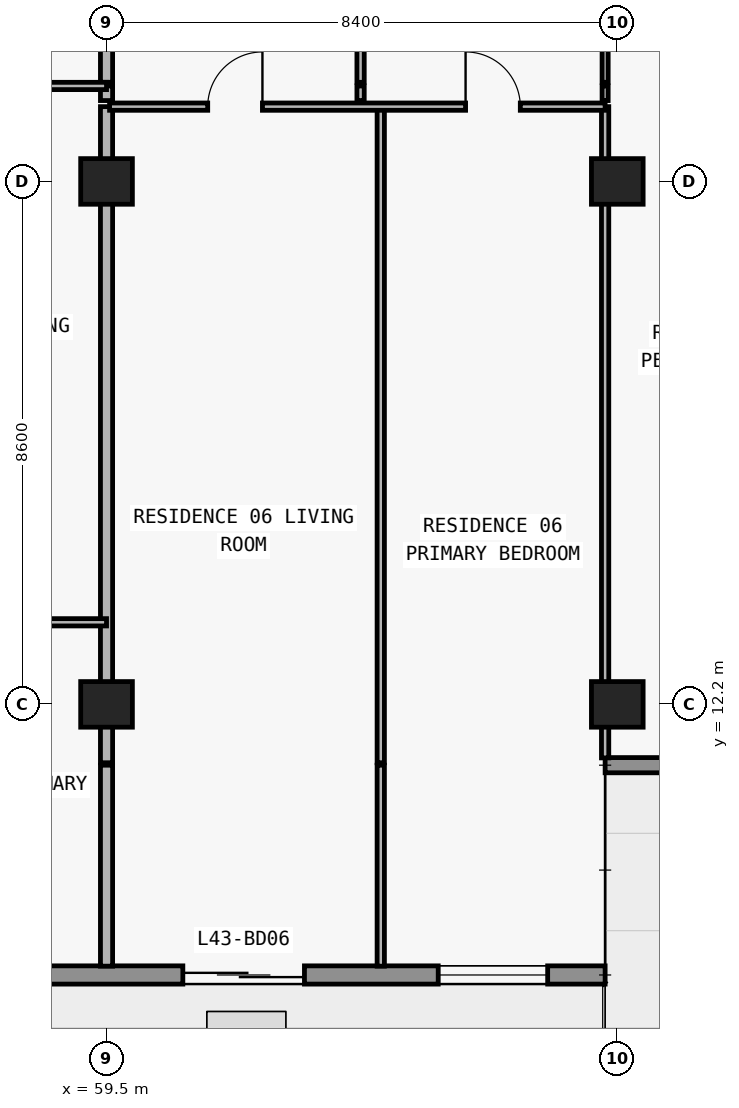
"""IFC4 building model, lengths in metres.
Left out: names, types, materials, properties, quantities, classifications, styles, units other than length and angle.
Written with IfcOpenShell. Run it as: python <this file> out.ifc"""

import sys

from ifc_helpers import new_model, si_unit, direction, frame, frame_2d, origin, origin_2d, place, context, subcontext, project, spatial, rectangle, extrude, element, fill, save


model = new_model("IFC4")
c1 = context("Model", 3, precision=1e-05, world=origin(), true_north=direction((0.0, 1.0)))
c2 = subcontext(c1, "Body", "Model", "MODEL_VIEW")
j1 = project(units=[si_unit("LENGTHUNIT", "METRE"), si_unit("PLANEANGLEUNIT", "RADIAN")], contexts=[c1])
p1 = place(None, origin())
s1 = spatial("IfcSite", under=j1, at=p1, CompositionType="ELEMENT")
p2 = place(p1, origin())
s2 = spatial("IfcBuilding", under=s1, at=p2, CompositionType="ELEMENT")
p3 = place(p2, frame((0.0, 0.0, 157.2)))
s3 = spatial("IfcBuildingStorey", under=s2, at=p3, CompositionType="ELEMENT", Elevation=157.2)
for number, where, z_axis, x_axis in (
    (1, (59.5, 12.2, 0.0), (0.0, 0.0, 1.0), (1.0, 0.0, 0.0)),
    (2, (67.9, 12.2, 0.0), (0.0, 0.0, 1.0), (1.0, 0.0, 0.0)),
    (3, (59.5, 20.8, 0.0), (0.0, 0.0, 1.0), (1.0, 0.0, 0.0)),
    (4, (67.9, 20.8, 0.0), (0.0, 0.0, 1.0), (1.0, 0.0, 0.0)),
):
    element("IfcColumn", number, at=place(p3, frame(where, z_axis=z_axis, x_axis=x_axis)), inside=s3, PredefinedType="COLUMN", context=c2, shape_type="SweptSolid", body=[
        extrude(rectangle(XDim=0.85, YDim=0.75, at=origin_2d()), origin(), (0.0, 0.0, 1.0), 3.05),
    ])
p4 = place(p3, frame((67.7, 7.75, 0.0), z_axis=(0.0, 0.0, 1.0), x_axis=(-1.0, 0.0, 0.0)))
e5 = element("IfcWall", 5, at=p4, inside=s3, PredefinedType="STANDARD", context=c2, shape_type="SweptSolid", body=[
    extrude(rectangle(XDim=57.6, YDim=0.3, at=frame_2d((28.8, 0.0))), origin(), (0.0, 0.0, 1.0), 3.05),
])
p5 = place(p4, frame((54.673, 0.0, 0.0)))
e6 = element("IfcOpeningElement", 6, at=p5, cuts=e5, PredefinedType="OPENING", context=c2, shape_type="SweptSolid", body=[
    extrude(rectangle(XDim=2.0, YDim=2.3, at=frame_2d((1.0, 1.15))), frame((0.0, 0.16, 0.0), z_axis=(0.0, -1.0, 0.0), x_axis=(1.0, 0.0, 0.0)), (0.0, 0.0, 1.0), 0.32),
])
p6 = place(p4, frame((50.473, 0.0, 0.85)))
e7 = element("IfcOpeningElement", 7, at=p6, cuts=e5, PredefinedType="OPENING", context=c2, shape_type="SweptSolid", body=[
    extrude(rectangle(XDim=2.2, YDim=1.55, at=frame_2d((1.1, 0.775))), frame((0.0, 0.16, 0.0), z_axis=(0.0, -1.0, 0.0), x_axis=(1.0, 0.0, 0.0)), (0.0, 0.0, 1.0), 0.32),
])
p7 = place(p4, frame((46.09, 0.0, 0.0)))
e8 = element("IfcOpeningElement", 8, at=p7, cuts=e5, PredefinedType="OPENING", context=c2, shape_type="SweptSolid", body=[
    extrude(rectangle(XDim=2.0, YDim=2.3, at=frame_2d((1.0, 1.15))), frame((0.0, 0.16, 0.0), z_axis=(0.0, -1.0, 0.0), x_axis=(1.0, 0.0, 0.0)), (0.0, 0.0, 1.0), 0.32),
])
p8 = place(p4, frame((41.99, 0.0, 0.85)))
e9 = element("IfcOpeningElement", 9, at=p8, cuts=e5, PredefinedType="OPENING", context=c2, shape_type="SweptSolid", body=[
    extrude(rectangle(XDim=1.8, YDim=1.55, at=frame_2d((0.9, 0.775))), frame((0.0, 0.16, 0.0), z_axis=(0.0, -1.0, 0.0), x_axis=(1.0, 0.0, 0.0)), (0.0, 0.0, 1.0), 0.32),
])
p9 = place(p4, frame((38.09, 0.0, 0.0)))
e10 = element("IfcOpeningElement", 10, at=p9, cuts=e5, PredefinedType="OPENING", context=c2, shape_type="SweptSolid", body=[
    extrude(rectangle(XDim=2.0, YDim=2.3, at=frame_2d((1.0, 1.15))), frame((0.0, 0.16, 0.0), z_axis=(0.0, -1.0, 0.0), x_axis=(1.0, 0.0, 0.0)), (0.0, 0.0, 1.0), 0.32),
])
p10 = place(p4, frame((33.41, 0.0, 0.65)))
e11 = element("IfcOpeningElement", 11, at=p10, cuts=e5, PredefinedType="OPENING", context=c2, shape_type="SweptSolid", body=[
    extrude(rectangle(XDim=2.6, YDim=1.85, at=frame_2d((1.3, 0.925))), frame((0.0, 0.16, 0.0), z_axis=(0.0, -1.0, 0.0), x_axis=(1.0, 0.0, 0.0)), (0.0, 0.0, 1.0), 0.32),
])
p11 = place(p4, frame((27.7, 0.0, 0.85)))
e12 = element("IfcOpeningElement", 12, at=p11, cuts=e5, PredefinedType="OPENING", context=c2, shape_type="SweptSolid", body=[
    extrude(rectangle(XDim=2.2, YDim=1.55, at=frame_2d((1.1, 0.775))), frame((0.0, 0.16, 0.0), z_axis=(0.0, -1.0, 0.0), x_axis=(1.0, 0.0, 0.0)), (0.0, 0.0, 1.0), 0.32),
])
p12 = place(p4, frame((21.69, 0.0, 0.0)))
e13 = element("IfcOpeningElement", 13, at=p12, cuts=e5, PredefinedType="OPENING", context=c2, shape_type="SweptSolid", body=[
    extrude(rectangle(XDim=2.0, YDim=2.3, at=frame_2d((1.0, 1.15))), frame((0.0, 0.16, 0.0), z_axis=(0.0, -1.0, 0.0), x_axis=(1.0, 0.0, 0.0)), (0.0, 0.0, 1.0), 0.32),
])
p13 = place(p4, frame((17.59, 0.0, 0.85)))
e14 = element("IfcOpeningElement", 14, at=p13, cuts=e5, PredefinedType="OPENING", context=c2, shape_type="SweptSolid", body=[
    extrude(rectangle(XDim=1.8, YDim=1.55, at=frame_2d((0.9, 0.775))), frame((0.0, 0.16, 0.0), z_axis=(0.0, -1.0, 0.0), x_axis=(1.0, 0.0, 0.0)), (0.0, 0.0, 1.0), 0.32),
])
p14 = place(p4, frame((13.626, 0.0, 0.0)))
e15 = element("IfcOpeningElement", 15, at=p14, cuts=e5, PredefinedType="OPENING", context=c2, shape_type="SweptSolid", body=[
    extrude(rectangle(XDim=2.0, YDim=2.3, at=frame_2d((1.0, 1.15))), frame((0.0, 0.16, 0.0), z_axis=(0.0, -1.0, 0.0), x_axis=(1.0, 0.0, 0.0)), (0.0, 0.0, 1.0), 0.32),
])
p15 = place(p4, frame((9.326, 0.0, 0.85)))
e16 = element("IfcOpeningElement", 16, at=p15, cuts=e5, PredefinedType="OPENING", context=c2, shape_type="SweptSolid", body=[
    extrude(rectangle(XDim=2.2, YDim=1.55, at=frame_2d((1.1, 0.775))), frame((0.0, 0.16, 0.0), z_axis=(0.0, -1.0, 0.0), x_axis=(1.0, 0.0, 0.0)), (0.0, 0.0, 1.0), 0.32),
])
p16 = place(p4, frame((4.945, 0.0, 0.0)))
e17 = element("IfcOpeningElement", 17, at=p16, cuts=e5, PredefinedType="OPENING", context=c2, shape_type="SweptSolid", body=[
    extrude(rectangle(XDim=2.0, YDim=2.3, at=frame_2d((1.0, 1.15))), frame((0.0, 0.16, 0.0), z_axis=(0.0, -1.0, 0.0), x_axis=(1.0, 0.0, 0.0)), (0.0, 0.0, 1.0), 0.32),
])
p17 = place(p4, frame((0.945, 0.0, 0.85)))
e18 = element("IfcOpeningElement", 18, at=p17, cuts=e5, PredefinedType="OPENING", context=c2, shape_type="SweptSolid", body=[
    extrude(rectangle(XDim=1.8, YDim=1.55, at=frame_2d((0.9, 0.775))), frame((0.0, 0.16, 0.0), z_axis=(0.0, -1.0, 0.0), x_axis=(1.0, 0.0, 0.0)), (0.0, 0.0, 1.0), 0.32),
])
p18 = place(p3, frame((67.7, 11.2, 0.0), z_axis=(0.0, 0.0, 1.0), x_axis=(1.0, 0.0, 0.0)))
e19 = element("IfcWall", 19, at=p18, inside=s3, PredefinedType="ELEMENTEDWALL", context=c2, shape_type="SweptSolid", body=[
    extrude(rectangle(XDim=3.85, YDim=0.25, at=frame_2d((1.925, 0.0))), origin(), (0.0, 0.0, 1.0), 3.05),
])
p19 = place(p3, frame((59.5, 7.895, 0.0), z_axis=(0.0, 0.0, 1.0), x_axis=(0.0, 1.0, 0.0)))
e20 = element("IfcWall", 20, at=p19, inside=s3, PredefinedType="PARTITIONING", context=c2, shape_type="SweptSolid", body=[
    extrude(rectangle(XDim=3.305, YDim=0.2, at=frame_2d((1.652, 0.0))), origin(), (0.0, 0.0, 1.0), 3.05),
])
p20 = place(p3, frame((59.5, 11.24, 0.0), z_axis=(0.0, 0.0, 1.0), x_axis=(0.0, 1.0, 0.0)))
e21 = element("IfcWall", 21, at=p20, inside=s3, PredefinedType="PARTITIONING", context=c2, shape_type="SweptSolid", body=[
    extrude(rectangle(XDim=10.79, YDim=0.2, at=frame_2d((5.395, 0.0))), origin(), (0.0, 0.0, 1.0), 2.263),
])
p21 = place(p3, frame((59.5, 22.13, 0.0), z_axis=(0.0, 0.0, 1.0), x_axis=(0.0, 1.0, 0.0)))
e22 = element("IfcWall", 22, at=p21, inside=s3, PredefinedType="PARTITIONING", context=c2, shape_type="SweptSolid", body=[
    extrude(rectangle(XDim=0.24, YDim=0.2, at=frame_2d((0.12, 0.0))), origin(), (0.0, 0.0, 1.0), 2.263),
])
p22 = place(p3, frame((59.5, 22.43, 0.0), z_axis=(0.0, 0.0, 1.0), x_axis=(0.0, 1.0, 0.0)))
e23 = element("IfcWall", 23, at=p22, inside=s3, PredefinedType="PARTITIONING", context=c2, shape_type="SweptSolid", body=[
    extrude(rectangle(XDim=4.75, YDim=0.2, at=frame_2d((2.375, 0.0))), origin(), (0.0, 0.0, 1.0), 2.263),
])
p23 = place(p3, frame((63.678, 22.13, 0.0), z_axis=(0.0, 0.0, 1.0), x_axis=(0.0, 1.0, 0.0)))
e24 = element("IfcWall", 24, at=p23, inside=s3, PredefinedType="PARTITIONING", context=c2, shape_type="SweptSolid", body=[
    extrude(rectangle(XDim=0.24, YDim=0.12, at=frame_2d((0.12, 0.0))), origin(), (0.0, 0.0, 1.0), 2.725),
])
p24 = place(p3, frame((63.678, 22.43, 0.0), z_axis=(0.0, 0.0, 1.0), x_axis=(0.0, 1.0, 0.0)))
e25 = element("IfcWall", 25, at=p24, inside=s3, PredefinedType="PARTITIONING", context=c2, shape_type="SweptSolid", body=[
    extrude(rectangle(XDim=4.75, YDim=0.12, at=frame_2d((2.375, 0.0))), origin(), (0.0, 0.0, 1.0), 2.725),
])
p25 = place(p24, frame((1.925, 0.0, 0.0)))
e26 = element("IfcOpeningElement", 26, at=p25, cuts=e25, PredefinedType="OPENING", context=c2, shape_type="SweptSolid", body=[
    extrude(rectangle(XDim=0.9, YDim=2.15, at=frame_2d((0.45, 1.075))), frame((0.0, 0.07, 0.0), z_axis=(0.0, -1.0, 0.0), x_axis=(1.0, 0.0, 0.0)), (0.0, 0.0, 1.0), 0.14),
])
p26 = place(p3, frame((64.01, 7.895, 0.0), z_axis=(0.0, 0.0, 1.0), x_axis=(0.0, 1.0, 0.0)))
e27 = element("IfcWall", 27, at=p26, inside=s3, PredefinedType="PARTITIONING", context=c2, shape_type="SweptSolid", body=[
    extrude(rectangle(XDim=3.305, YDim=0.12, at=frame_2d((1.652, 0.0))), origin(), (0.0, 0.0, 1.0), 3.05),
])
p27 = place(p3, frame((64.01, 11.24, 0.0), z_axis=(0.0, 0.0, 1.0), x_axis=(0.0, 1.0, 0.0)))
e28 = element("IfcWall", 28, at=p27, inside=s3, PredefinedType="PARTITIONING", context=c2, shape_type="SweptSolid", body=[
    extrude(rectangle(XDim=10.79, YDim=0.12, at=frame_2d((5.395, 0.0))), origin(), (0.0, 0.0, 1.0), 3.05),
])
p28 = place(p3, frame((67.7, 11.32, 0.0), z_axis=(0.0, 0.0, 1.0), x_axis=(0.0, 1.0, 0.0)))
e29 = element("IfcWall", 29, at=p28, inside=s3, PredefinedType="PARTITIONING", context=c2, shape_type="SweptSolid", body=[
    extrude(rectangle(XDim=10.71, YDim=0.12, at=frame_2d((5.355, 0.0))), origin(), (0.0, 0.0, 1.0), 2.263),
])
p29 = place(p3, frame((67.7, 22.13, 0.0), z_axis=(0.0, 0.0, 1.0), x_axis=(0.0, 1.0, 0.0)))
e30 = element("IfcWall", 30, at=p29, inside=s3, PredefinedType="MOVABLE", context=c2, shape_type="SweptSolid", body=[
    extrude(rectangle(XDim=0.24, YDim=0.1, at=frame_2d((0.12, 0.0))), origin(), (0.0, 0.0, 1.0), 2.263),
])
p30 = place(p3, frame((67.7, 22.43, 0.0), z_axis=(0.0, 0.0, 1.0), x_axis=(0.0, 1.0, 0.0)))
e31 = element("IfcWall", 31, at=p30, inside=s3, PredefinedType="MOVABLE", context=c2, shape_type="SweptSolid", body=[
    extrude(rectangle(XDim=4.75, YDim=0.1, at=frame_2d((2.375, 0.0))), origin(), (0.0, 0.0, 1.0), 2.263),
])
p31 = place(p30, frame((1.925, 0.0, 0.0)))
e32 = element("IfcOpeningElement", 32, at=p31, cuts=e31, PredefinedType="OPENING", context=c2, shape_type="SweptSolid", body=[
    extrude(rectangle(XDim=0.9, YDim=2.15, at=frame_2d((0.45, 1.075))), frame((0.0, 0.06, 0.0), z_axis=(0.0, -1.0, 0.0), x_axis=(1.0, 0.0, 0.0)), (0.0, 0.0, 1.0), 0.12),
])
p32 = place(p3, frame((55.9, 13.55, 0.0), z_axis=(0.0, 0.0, 1.0), x_axis=(1.0, 0.0, 0.0)))
e33 = element("IfcWall", 33, at=p32, inside=s3, PredefinedType="PARTITIONING", context=c2, shape_type="SweptSolid", body=[
    extrude(rectangle(XDim=3.6, YDim=0.12, at=frame_2d((1.8, 0.0))), origin(), (0.0, 0.0, 1.0), 3.05),
])
p33 = place(p32, frame((1.35, 0.0, 0.0)))
e34 = element("IfcOpeningElement", 34, at=p33, cuts=e33, PredefinedType="OPENING", context=c2, shape_type="SweptSolid", body=[
    extrude(rectangle(XDim=0.9, YDim=2.15, at=frame_2d((0.45, 1.075))), frame((0.0, 0.07, 0.0), z_axis=(0.0, -1.0, 0.0), x_axis=(1.0, 0.0, 0.0)), (0.0, 0.0, 1.0), 0.14),
])
p34 = place(p3, frame((59.55, 22.03, 0.0), z_axis=(0.0, 0.0, 1.0), x_axis=(1.0, 0.0, 0.0)))
e35 = element("IfcWall", 35, at=p34, inside=s3, PredefinedType="PARTITIONING", context=c2, shape_type="SweptSolid", body=[
    extrude(rectangle(XDim=8.15, YDim=0.12, at=frame_2d((4.075, 0.0))), origin(), (0.0, 0.0, 1.0), 3.05),
])
p35 = place(p34, frame((1.614, 0.0, 0.0)))
e36 = element("IfcOpeningElement", 36, at=p35, cuts=e35, PredefinedType="OPENING", context=c2, shape_type="SweptSolid", body=[
    extrude(rectangle(XDim=0.9, YDim=2.15, at=frame_2d((0.45, 1.075))), frame((0.0, 0.07, 0.0), z_axis=(0.0, -1.0, 0.0), x_axis=(1.0, 0.0, 0.0)), (0.0, 0.0, 1.0), 0.14),
])
p36 = place(p34, frame((5.855, 0.0, 0.0)))
e37 = element("IfcOpeningElement", 37, at=p36, cuts=e35, PredefinedType="OPENING", context=c2, shape_type="SweptSolid", body=[
    extrude(rectangle(XDim=0.9, YDim=2.15, at=frame_2d((0.45, 1.075))), frame((0.0, 0.07, 0.0), z_axis=(0.0, -1.0, 0.0), x_axis=(1.0, 0.0, 0.0)), (0.0, 0.0, 1.0), 0.14),
])
p37 = place(p3, frame((55.9, 22.37, 0.0), z_axis=(0.0, 0.0, 1.0), x_axis=(1.0, 0.0, 0.0)))
e38 = element("IfcWall", 38, at=p37, inside=s3, PredefinedType="PARTITIONING", context=c2, shape_type="SweptSolid", body=[
    extrude(rectangle(XDim=3.6, YDim=0.12, at=frame_2d((1.8, 0.0))), origin(), (0.0, 0.0, 1.0), 3.05),
])
p38 = place(p37, frame((1.35, 0.0, 0.0)))
e39 = element("IfcOpeningElement", 39, at=p38, cuts=e38, PredefinedType="OPENING", context=c2, shape_type="SweptSolid", body=[
    extrude(rectangle(XDim=0.9, YDim=2.15, at=frame_2d((0.45, 1.075))), frame((0.0, 0.07, 0.0), z_axis=(0.0, -1.0, 0.0), x_axis=(1.0, 0.0, 0.0)), (0.0, 0.0, 1.0), 0.14),
])
p39 = place(p16, origin())
e40 = element("IfcDoor", 40, at=p39, inside=s3, OperationType="DOUBLE_DOOR_SLIDING", PredefinedType="DOOR", context=c2, shape_type="SweptSolid", body=[
    extrude(rectangle(XDim=2.0, YDim=2.3, at=frame_2d((1.0, 1.15))), frame((0.0, 0.025, 0.0), z_axis=(0.0, -1.0, 0.0), x_axis=(1.0, 0.0, 0.0)), (0.0, 0.0, 1.0), 0.05),
])
fill(e17, e40)
p40 = place(p17, origin())
e41 = element("IfcWindow", 41, at=p40, inside=s3, PartitioningType="SINGLE_PANEL", PredefinedType="WINDOW", context=c2, shape_type="SweptSolid", body=[
    extrude(rectangle(XDim=1.8, YDim=1.55, at=frame_2d((0.9, 0.775))), frame((0.0, 0.03, 0.0), z_axis=(0.0, -1.0, 0.0), x_axis=(1.0, 0.0, 0.0)), (0.0, 0.0, 1.0), 0.06),
])
fill(e18, e41)
p41 = place(p35, origin())
e42 = element("IfcDoor", 42, at=p41, inside=s3, OperationType="SINGLE_SWING_RIGHT", PredefinedType="DOOR", context=c2, shape_type="SweptSolid", body=[
    extrude(rectangle(XDim=0.9, YDim=2.15, at=frame_2d((0.45, 1.075))), frame((0.0, 0.025, 0.0), z_axis=(0.0, -1.0, 0.0), x_axis=(1.0, 0.0, 0.0)), (0.0, 0.0, 1.0), 0.05),
])
fill(e36, e42)
p42 = place(p36, origin())
e43 = element("IfcDoor", 43, at=p42, inside=s3, OperationType="SINGLE_SWING_LEFT", PredefinedType="DOOR", context=c2, shape_type="SweptSolid", body=[
    extrude(rectangle(XDim=0.9, YDim=2.15, at=frame_2d((0.45, 1.075))), frame((0.0, 0.025, 0.0), z_axis=(0.0, -1.0, 0.0), x_axis=(1.0, 0.0, 0.0)), (0.0, 0.0, 1.0), 0.05),
])
fill(e37, e43)
save(model, sys.argv[1])
